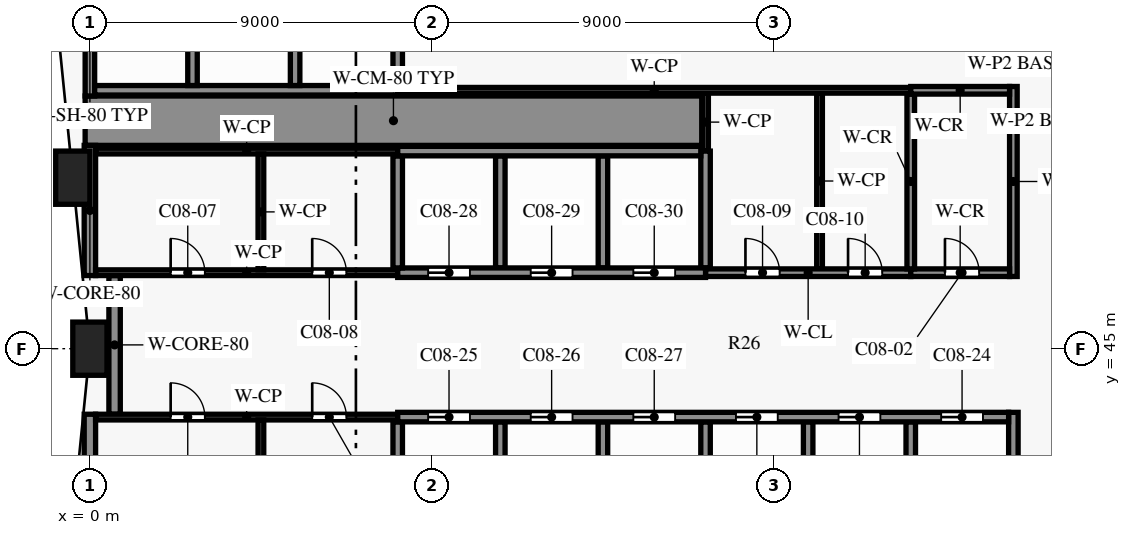
"""IFC4 building model, lengths in metres.
Left out: names, types, materials, properties, quantities, classifications, styles, units other than length and angle.
Written with IfcOpenShell. Run it as: python <this file> out.ifc"""

import sys

from ifc_helpers import new_model, si_unit, direction, frame, frame_2d, origin, origin_2d, place, context, subcontext, project, spatial, rectangle, extrude, element, fill, save


model = new_model("IFC4")
c1 = context("Model", 3, precision=1e-05, world=origin(), true_north=direction((0.0, 1.0)))
c2 = subcontext(c1, "Body", "Model", "MODEL_VIEW")
j1 = project(units=[si_unit("LENGTHUNIT", "METRE"), si_unit("PLANEANGLEUNIT", "RADIAN")], contexts=[c1])
p1 = place(None, origin())
s1 = spatial("IfcSite", under=j1, at=p1, CompositionType="ELEMENT")
p2 = place(p1, origin())
s2 = spatial("IfcBuilding", under=s1, at=p2, CompositionType="ELEMENT")
p3 = place(p2, frame((0.0, 0.0, 44.7)))
s3 = spatial("IfcBuildingStorey", under=s2, at=p3, CompositionType="ELEMENT", Elevation=44.7)
for number, where, z_axis, x_axis in (
    (1, (-0.45, 49.5, 0.0), (0.0, 0.0, 1.0), (0.1, -0.995, 0.0)),
    (2, (0.0, 45.0, 0.0), (0.0, 0.0, 1.0), (0.0, -1.0, 0.0)),
):
    element("IfcColumn", number, at=place(p3, frame(where, z_axis=z_axis, x_axis=x_axis)), inside=s3, PredefinedType="COLUMN", context=c2, shape_type="SweptSolid", body=[
        extrude(rectangle(XDim=0.9, YDim=1.4, at=origin_2d()), origin(), (0.0, 0.0, 1.0), 3.6),
    ])
p4 = place(p3, frame((0.15, 43.2, 0.0), z_axis=(0.0, 0.0, 1.0), x_axis=(1.0, 0.0, 0.0)))
e3 = element("IfcWall", 3, at=p4, inside=s3, PredefinedType="PARTITIONING", context=c2, shape_type="SweptSolid", body=[
    extrude(rectangle(XDim=7.95, YDim=0.15, at=frame_2d((3.975, 0.0))), origin(), (0.0, 0.0, 1.0), 3.3),
])
p5 = place(p4, frame((1.975, 0.0, 0.0)))
e4 = element("IfcOpeningElement", 4, at=p5, cuts=e3, PredefinedType="OPENING", context=c2, shape_type="SweptSolid", body=[
    extrude(rectangle(XDim=0.9, YDim=2.1, at=frame_2d((0.45, 1.05))), frame((0.0, 0.085, 0.0), z_axis=(0.0, -1.0, 0.0), x_axis=(1.0, 0.0, 0.0)), (0.0, 0.0, 1.0), 0.17),
])
p6 = place(p4, frame((5.7, 0.0, 0.0)))
e5 = element("IfcOpeningElement", 5, at=p6, cuts=e3, PredefinedType="OPENING", context=c2, shape_type="SweptSolid", body=[
    extrude(rectangle(XDim=0.9, YDim=2.1, at=frame_2d((0.45, 1.05))), frame((0.0, 0.085, 0.0), z_axis=(0.0, -1.0, 0.0), x_axis=(1.0, 0.0, 0.0)), (0.0, 0.0, 1.0), 0.17),
])
p7 = place(p3, frame((8.1, 43.2, 0.0), z_axis=(0.0, 0.0, 1.0), x_axis=(1.0, 0.0, 0.0)))
e6 = element("IfcWall", 6, at=p7, inside=s3, PredefinedType="SHEAR", context=c2, shape_type="SweptSolid", body=[
    extrude(rectangle(XDim=16.075, YDim=0.25, at=frame_2d((8.038, 0.0))), origin(), (0.0, 0.0, 1.0), 3.3),
])
p8 = place(p7, frame((14.3, 0.0, 0.0)))
e7 = element("IfcOpeningElement", 7, at=p8, cuts=e6, PredefinedType="OPENING", context=c2, shape_type="SweptSolid", body=[
    extrude(rectangle(XDim=1.1, YDim=2.1, at=frame_2d((0.55, 1.05))), frame((0.0, 0.135, 0.0), z_axis=(0.0, -1.0, 0.0), x_axis=(1.0, 0.0, 0.0)), (0.0, 0.0, 1.0), 0.27),
])
p9 = place(p7, frame((0.8, 0.0, 0.0)))
e8 = element("IfcOpeningElement", 8, at=p9, cuts=e6, PredefinedType="OPENING", context=c2, shape_type="SweptSolid", body=[
    extrude(rectangle(XDim=1.1, YDim=2.1, at=frame_2d((0.55, 1.05))), frame((0.0, 0.135, 0.0), z_axis=(0.0, -1.0, 0.0), x_axis=(1.0, 0.0, 0.0)), (0.0, 0.0, 1.0), 0.27),
])
p10 = place(p7, frame((3.5, 0.0, 0.0)))
e9 = element("IfcOpeningElement", 9, at=p10, cuts=e6, PredefinedType="OPENING", context=c2, shape_type="SweptSolid", body=[
    extrude(rectangle(XDim=1.1, YDim=2.1, at=frame_2d((0.55, 1.05))), frame((0.0, 0.135, 0.0), z_axis=(0.0, -1.0, 0.0), x_axis=(1.0, 0.0, 0.0)), (0.0, 0.0, 1.0), 0.27),
])
p11 = place(p7, frame((6.2, 0.0, 0.0)))
e10 = element("IfcOpeningElement", 10, at=p11, cuts=e6, PredefinedType="OPENING", context=c2, shape_type="SweptSolid", body=[
    extrude(rectangle(XDim=1.1, YDim=2.1, at=frame_2d((0.55, 1.05))), frame((0.0, 0.135, 0.0), z_axis=(0.0, -1.0, 0.0), x_axis=(1.0, 0.0, 0.0)), (0.0, 0.0, 1.0), 0.27),
])
p12 = place(p7, frame((8.9, 0.0, 0.0)))
e11 = element("IfcOpeningElement", 11, at=p12, cuts=e6, PredefinedType="OPENING", context=c2, shape_type="SweptSolid", body=[
    extrude(rectangle(XDim=1.1, YDim=2.1, at=frame_2d((0.55, 1.05))), frame((0.0, 0.135, 0.0), z_axis=(0.0, -1.0, 0.0), x_axis=(1.0, 0.0, 0.0)), (0.0, 0.0, 1.0), 0.27),
])
p13 = place(p7, frame((11.6, 0.0, 0.0)))
e12 = element("IfcOpeningElement", 12, at=p13, cuts=e6, PredefinedType="OPENING", context=c2, shape_type="SweptSolid", body=[
    extrude(rectangle(XDim=1.1, YDim=2.1, at=frame_2d((0.55, 1.05))), frame((0.0, 0.135, 0.0), z_axis=(0.0, -1.0, 0.0), x_axis=(1.0, 0.0, 0.0)), (0.0, 0.0, 1.0), 0.27),
])
p14 = place(p3, frame((16.2, 47.0, 0.0), z_axis=(0.0, 0.0, 1.0), x_axis=(1.0, 0.0, 0.0)))
e13 = element("IfcWall", 13, at=p14, inside=s3, PredefinedType="PARTITIONING", context=c2, shape_type="SweptSolid", body=[
    extrude(rectangle(XDim=5.4, YDim=0.2, at=frame_2d((2.7, 0.0))), origin(), (0.0, 0.0, 1.0), 3.3),
])
p15 = place(p14, frame((1.05, 0.0, 0.0)))
e14 = element("IfcOpeningElement", 14, at=p15, cuts=e13, PredefinedType="OPENING", context=c2, shape_type="SweptSolid", body=[
    extrude(rectangle(XDim=0.9, YDim=2.1, at=frame_2d((0.45, 1.05))), frame((0.0, 0.11, 0.0), z_axis=(0.0, -1.0, 0.0), x_axis=(1.0, 0.0, 0.0)), (0.0, 0.0, 1.0), 0.22),
])
p16 = place(p14, frame((3.75, 0.0, 0.0)))
e15 = element("IfcOpeningElement", 15, at=p16, cuts=e13, PredefinedType="OPENING", context=c2, shape_type="SweptSolid", body=[
    extrude(rectangle(XDim=0.9, YDim=2.1, at=frame_2d((0.45, 1.05))), frame((0.0, 0.11, 0.0), z_axis=(0.0, -1.0, 0.0), x_axis=(1.0, 0.0, 0.0)), (0.0, 0.0, 1.0), 0.22),
])
p17 = place(p3, frame((0.15, 47.0, 0.0), z_axis=(0.0, 0.0, 1.0), x_axis=(1.0, 0.0, 0.0)))
e16 = element("IfcWall", 16, at=p17, inside=s3, PredefinedType="PARTITIONING", context=c2, shape_type="SweptSolid", body=[
    extrude(rectangle(XDim=7.95, YDim=0.15, at=frame_2d((3.975, 0.0))), origin(), (0.0, 0.0, 1.0), 3.3),
])
p18 = place(p17, frame((1.975, 0.0, 0.0)))
e17 = element("IfcOpeningElement", 17, at=p18, cuts=e16, PredefinedType="OPENING", context=c2, shape_type="SweptSolid", body=[
    extrude(rectangle(XDim=0.9, YDim=2.1, at=frame_2d((0.45, 1.05))), frame((0.0, 0.085, 0.0), z_axis=(0.0, -1.0, 0.0), x_axis=(1.0, 0.0, 0.0)), (0.0, 0.0, 1.0), 0.17),
])
p19 = place(p17, frame((5.7, 0.0, 0.0)))
e18 = element("IfcOpeningElement", 18, at=p19, cuts=e16, PredefinedType="OPENING", context=c2, shape_type="SweptSolid", body=[
    extrude(rectangle(XDim=0.9, YDim=2.1, at=frame_2d((0.45, 1.05))), frame((0.0, 0.085, 0.0), z_axis=(0.0, -1.0, 0.0), x_axis=(1.0, 0.0, 0.0)), (0.0, 0.0, 1.0), 0.17),
])
p20 = place(p3, frame((21.6, 47.0, 0.0), z_axis=(0.0, 0.0, 1.0), x_axis=(1.0, 0.0, 0.0)))
e19 = element("IfcWall", 19, at=p20, inside=s3, PredefinedType="PARTITIONING", context=c2, shape_type="SweptSolid", body=[
    extrude(rectangle(XDim=2.6, YDim=0.2, at=frame_2d((1.3, 0.0))), origin(), (0.0, 0.0, 1.0), 3.3),
])
p21 = place(p20, frame((0.9, 0.0, 0.0)))
e20 = element("IfcOpeningElement", 20, at=p21, cuts=e19, PredefinedType="OPENING", context=c2, shape_type="SweptSolid", body=[
    extrude(rectangle(XDim=0.9, YDim=2.1, at=frame_2d((0.45, 1.05))), frame((0.0, 0.11, 0.0), z_axis=(0.0, -1.0, 0.0), x_axis=(1.0, 0.0, 0.0)), (0.0, 0.0, 1.0), 0.22),
])
p22 = place(p3, frame((8.1, 47.0, 0.0), z_axis=(0.0, 0.0, 1.0), x_axis=(1.0, 0.0, 0.0)))
e21 = element("IfcWall", 21, at=p22, inside=s3, PredefinedType="SHEAR", context=c2, shape_type="SweptSolid", body=[
    extrude(rectangle(XDim=8.1, YDim=0.25, at=frame_2d((4.05, 0.0))), origin(), (0.0, 0.0, 1.0), 3.3),
])
p23 = place(p22, frame((0.8, 0.0, 0.0)))
e22 = element("IfcOpeningElement", 22, at=p23, cuts=e21, PredefinedType="OPENING", context=c2, shape_type="SweptSolid", body=[
    extrude(rectangle(XDim=1.1, YDim=2.1, at=frame_2d((0.55, 1.05))), frame((0.0, 0.135, 0.0), z_axis=(0.0, -1.0, 0.0), x_axis=(1.0, 0.0, 0.0)), (0.0, 0.0, 1.0), 0.27),
])
p24 = place(p22, frame((3.5, 0.0, 0.0)))
e23 = element("IfcOpeningElement", 23, at=p24, cuts=e21, PredefinedType="OPENING", context=c2, shape_type="SweptSolid", body=[
    extrude(rectangle(XDim=1.1, YDim=2.1, at=frame_2d((0.55, 1.05))), frame((0.0, 0.135, 0.0), z_axis=(0.0, -1.0, 0.0), x_axis=(1.0, 0.0, 0.0)), (0.0, 0.0, 1.0), 0.27),
])
p25 = place(p22, frame((6.2, 0.0, 0.0)))
e24 = element("IfcOpeningElement", 24, at=p25, cuts=e21, PredefinedType="OPENING", context=c2, shape_type="SweptSolid", body=[
    extrude(rectangle(XDim=1.1, YDim=2.1, at=frame_2d((0.55, 1.05))), frame((0.0, 0.135, 0.0), z_axis=(0.0, -1.0, 0.0), x_axis=(1.0, 0.0, 0.0)), (0.0, 0.0, 1.0), 0.27),
])
p26 = place(p3, frame((0.15, 50.2, 0.0), z_axis=(0.0, 0.0, 1.0), x_axis=(1.0, 0.0, 0.0)))
e25 = element("IfcWall", 25, at=p26, inside=s3, PredefinedType="PARTITIONING", context=c2, shape_type="SweptSolid", body=[
    extrude(rectangle(XDim=7.95, YDim=0.15, at=frame_2d((3.975, 0.0))), origin(), (0.0, 0.0, 1.0), 3.3),
])
p27 = place(p3, frame((8.1, 50.2, 0.0), z_axis=(0.0, 0.0, 1.0), x_axis=(1.0, 0.0, 0.0)))
e26 = element("IfcWall", 26, at=p27, inside=s3, PredefinedType="SHEAR", context=c2, shape_type="SweptSolid", body=[
    extrude(rectangle(XDim=7.975, YDim=0.25, at=frame_2d((3.987, 0.0))), origin(), (0.0, 0.0, 1.0), 3.3),
])
p28 = place(p3, frame((-0.125, 51.0, 0.0), z_axis=(0.0, 0.0, 1.0), x_axis=(1.0, 0.0, 0.0)))
e27 = element("IfcWall", 27, at=p28, inside=s3, PredefinedType="SHEAR", context=c2, shape_type="SweptSolid", body=[
    extrude(rectangle(XDim=16.225, YDim=1.3, at=frame_2d((8.113, 0.0))), origin(), (0.0, 0.0, 1.0), 3.3),
])
p29 = place(p3, frame((8.1, 51.8, 0.0), z_axis=(0.0, 0.0, 1.0), x_axis=(1.0, 0.0, 0.0)))
e28 = element("IfcWall", 28, at=p29, inside=s3, PredefinedType="PARTITIONING", context=c2, shape_type="SweptSolid", body=[
    extrude(rectangle(XDim=13.5, YDim=0.15, at=frame_2d((6.75, 0.0))), origin(), (0.0, 0.0, 1.0), 3.3),
])
p30 = place(p3, frame((21.6, 51.8, 0.0), z_axis=(0.0, 0.0, 1.0), x_axis=(1.0, 0.0, 0.0)))
e29 = element("IfcWall", 29, at=p30, inside=s3, PredefinedType="PARTITIONING", context=c2, shape_type="SweptSolid", body=[
    extrude(rectangle(XDim=2.6, YDim=0.2, at=frame_2d((1.3, 0.0))), origin(), (0.0, 0.0, 1.0), 3.3),
])
p31 = place(p3, frame((0.125, 51.8, 0.0), z_axis=(0.0, 0.0, 1.0), x_axis=(1.0, 0.0, 0.0)))
e30 = element("IfcWall", 30, at=p31, inside=s3, PredefinedType="SHEAR", context=c2, shape_type="SweptSolid", body=[
    extrude(rectangle(XDim=7.975, YDim=0.25, at=frame_2d((3.988, 0.0))), origin(), (0.0, 0.0, 1.0), 3.3),
])
p32 = place(p3, frame((0.0, 35.925, 0.0), z_axis=(0.0, 0.0, 1.0), x_axis=(0.0, 1.0, 0.0)))
e31 = element("IfcWall", 31, at=p32, inside=s3, PredefinedType="SHEAR", context=c2, shape_type="SweptSolid", body=[
    extrude(rectangle(XDim=7.35, YDim=0.3, at=frame_2d((3.675, 0.0))), origin(), (0.0, 0.0, 1.0), 3.3),
])
p33 = place(p3, frame((0.0, 46.925, 0.0), z_axis=(0.0, 0.0, 1.0), x_axis=(0.0, 1.0, 0.0)))
e32 = element("IfcWall", 32, at=p33, inside=s3, PredefinedType="SHEAR", context=c2, shape_type="SweptSolid", body=[
    extrude(rectangle(XDim=3.425, YDim=0.3, at=frame_2d((1.712, 0.0))), origin(), (0.0, 0.0, 1.0), 3.3),
])
p34 = place(p3, frame((0.0, 51.65, 0.0), z_axis=(0.0, 0.0, 1.0), x_axis=(0.0, 1.0, 0.0)))
e33 = element("IfcWall", 33, at=p34, inside=s3, PredefinedType="SHEAR", context=c2, shape_type="SweptSolid", body=[
    extrude(rectangle(XDim=3.35, YDim=0.25, at=frame_2d((1.675, 0.0))), origin(), (0.0, 0.0, 1.0), 3.3),
])
p35 = place(p3, frame((0.65, 43.275, 0.0), z_axis=(0.0, 0.0, 1.0), x_axis=(0.0, 1.0, 0.0)))
e34 = element("IfcWall", 34, at=p35, inside=s3, PredefinedType="SHEAR", context=c2, shape_type="SweptSolid", body=[
    extrude(rectangle(XDim=3.65, YDim=0.3, at=frame_2d((1.825, 0.0))), origin(), (0.0, 0.0, 1.0), 3.3),
])
p36 = place(p3, frame((2.7, 51.925, 0.0), z_axis=(0.0, 0.0, 1.0), x_axis=(0.0, 1.0, 0.0)))
e35 = element("IfcWall", 35, at=p36, inside=s3, PredefinedType="SHEAR", context=c2, shape_type="SweptSolid", body=[
    extrude(rectangle(XDim=2.95, YDim=0.25, at=frame_2d((1.475, 0.0))), origin(), (0.0, 0.0, 1.0), 3.3),
])
for number, where, z_axis, x_axis in (
    (36, (4.5, 40.075, 0.0), (0.0, 0.0, 1.0), (0.0, 1.0, 0.0)),
    (37, (4.5, 47.075, 0.0), (0.0, 0.0, 1.0), (0.0, 1.0, 0.0)),
):
    element("IfcWall", number, at=place(p3, frame(where, z_axis=z_axis, x_axis=x_axis)), inside=s3, PredefinedType="PARTITIONING", context=c2, shape_type="SweptSolid", body=[
        extrude(rectangle(XDim=3.05, YDim=0.15, at=frame_2d((1.525, 0.0))), origin(), (0.0, 0.0, 1.0), 3.3),
    ])
for number, where, z_axis, x_axis in (
    (38, (5.4, 51.925, 0.0), (0.0, 0.0, 1.0), (0.0, 1.0, 0.0)),
    (39, (8.1, 40.125, 0.0), (0.0, 0.0, 1.0), (0.0, 1.0, 0.0)),
    (40, (8.1, 47.125, 0.0), (0.0, 0.0, 1.0), (0.0, 1.0, 0.0)),
    (41, (8.1, 51.925, 0.0), (0.0, 0.0, 1.0), (0.0, 1.0, 0.0)),
    (42, (10.8, 40.125, 0.0), (0.0, 0.0, 1.0), (0.0, 1.0, 0.0)),
    (43, (10.8, 47.125, 0.0), (0.0, 0.0, 1.0), (0.0, 1.0, 0.0)),
    (44, (13.5, 40.125, 0.0), (0.0, 0.0, 1.0), (0.0, 1.0, 0.0)),
    (45, (13.5, 47.125, 0.0), (0.0, 0.0, 1.0), (0.0, 1.0, 0.0)),
):
    element("IfcWall", number, at=place(p3, frame(where, z_axis=z_axis, x_axis=x_axis)), inside=s3, PredefinedType="SHEAR", context=c2, shape_type="SweptSolid", body=[
        extrude(rectangle(XDim=2.95, YDim=0.25, at=frame_2d((1.475, 0.0))), origin(), (0.0, 0.0, 1.0), 3.3),
    ])
p37 = place(p3, frame((16.2, 50.2, 0.0), z_axis=(0.0, 0.0, 1.0), x_axis=(0.0, 1.0, 0.0)))
e46 = element("IfcWall", 46, at=p37, inside=s3, PredefinedType="PARTITIONING", context=c2, shape_type="SweptSolid", body=[
    extrude(rectangle(XDim=1.525, YDim=0.15, at=frame_2d((0.763, 0.0))), origin(), (0.0, 0.0, 1.0), 3.3),
])
p38 = place(p3, frame((16.2, 40.125, 0.0), z_axis=(0.0, 0.0, 1.0), x_axis=(0.0, 1.0, 0.0)))
e47 = element("IfcWall", 47, at=p38, inside=s3, PredefinedType="SHEAR", context=c2, shape_type="SweptSolid", body=[
    extrude(rectangle(XDim=2.95, YDim=0.25, at=frame_2d((1.475, 0.0))), origin(), (0.0, 0.0, 1.0), 3.3),
])
p39 = place(p3, frame((16.2, 47.125, 0.0), z_axis=(0.0, 0.0, 1.0), x_axis=(0.0, 1.0, 0.0)))
e48 = element("IfcWall", 48, at=p39, inside=s3, PredefinedType="SHEAR", context=c2, shape_type="SweptSolid", body=[
    extrude(rectangle(XDim=3.075, YDim=0.25, at=frame_2d((1.538, 0.0))), origin(), (0.0, 0.0, 1.0), 3.3),
])
p40 = place(p3, frame((18.9, 40.125, 0.0), z_axis=(0.0, 0.0, 1.0), x_axis=(0.0, 1.0, 0.0)))
e49 = element("IfcWall", 49, at=p40, inside=s3, PredefinedType="SHEAR", context=c2, shape_type="SweptSolid", body=[
    extrude(rectangle(XDim=2.95, YDim=0.25, at=frame_2d((1.475, 0.0))), origin(), (0.0, 0.0, 1.0), 3.3),
])
p41 = place(p3, frame((19.2, 47.1, 0.0), z_axis=(0.0, 0.0, 1.0), x_axis=(0.0, 1.0, 0.0)))
e50 = element("IfcWall", 50, at=p41, inside=s3, PredefinedType="PARTITIONING", context=c2, shape_type="SweptSolid", body=[
    extrude(rectangle(XDim=4.625, YDim=0.15, at=frame_2d((2.312, 0.0))), origin(), (0.0, 0.0, 1.0), 3.3),
])
p42 = place(p3, frame((21.6, 47.1, 0.0), z_axis=(0.0, 0.0, 1.0), x_axis=(0.0, 1.0, 0.0)))
e51 = element("IfcWall", 51, at=p42, inside=s3, PredefinedType="PARTITIONING", context=c2, shape_type="SweptSolid", body=[
    extrude(rectangle(XDim=4.6, YDim=0.2, at=frame_2d((2.3, 0.0))), origin(), (0.0, 0.0, 1.0), 3.3),
])
p43 = place(p3, frame((21.6, 40.125, 0.0), z_axis=(0.0, 0.0, 1.0), x_axis=(0.0, 1.0, 0.0)))
e52 = element("IfcWall", 52, at=p43, inside=s3, PredefinedType="SHEAR", context=c2, shape_type="SweptSolid", body=[
    extrude(rectangle(XDim=2.95, YDim=0.25, at=frame_2d((1.475, 0.0))), origin(), (0.0, 0.0, 1.0), 3.3),
])
p44 = place(p3, frame((24.3, 46.9, 0.0), z_axis=(0.0, 0.0, 1.0), x_axis=(0.0, 1.0, 0.0)))
e53 = element("IfcWall", 53, at=p44, inside=s3, PredefinedType="SHEAR", context=c2, shape_type="SweptSolid", body=[
    extrude(rectangle(XDim=5.0, YDim=0.2, at=frame_2d((2.5, 0.0))), origin(), (0.0, 0.0, 1.0), 3.3),
])
p45 = place(p3, frame((24.3, 40.0, 0.0), z_axis=(0.0, 0.0, 1.0), x_axis=(0.0, 1.0, 0.0)))
e54 = element("IfcWall", 54, at=p45, inside=s3, PredefinedType="SHEAR", context=c2, shape_type="SweptSolid", body=[
    extrude(rectangle(XDim=3.325, YDim=0.25, at=frame_2d((1.663, 0.0))), origin(), (0.0, 0.0, 1.0), 3.3),
])
p46 = place(p21, origin())
e55 = element("IfcDoor", 55, at=p46, inside=s3, OperationType="SINGLE_SWING_LEFT", PredefinedType="DOOR", context=c2, shape_type="SweptSolid", body=[
    extrude(rectangle(XDim=0.9, YDim=2.1, at=frame_2d((0.45, 1.05))), frame((0.0, 0.025, 0.0), z_axis=(0.0, -1.0, 0.0), x_axis=(1.0, 0.0, 0.0)), (0.0, 0.0, 1.0), 0.05),
])
fill(e20, e55)
p47 = place(p18, origin())
e56 = element("IfcDoor", 56, at=p47, inside=s3, OperationType="SINGLE_SWING_RIGHT", PredefinedType="DOOR", context=c2, shape_type="SweptSolid", body=[
    extrude(rectangle(XDim=0.9, YDim=2.1, at=frame_2d((0.45, 1.05))), frame((0.0, 0.025, 0.0), z_axis=(0.0, -1.0, 0.0), x_axis=(1.0, 0.0, 0.0)), (0.0, 0.0, 1.0), 0.05),
])
fill(e17, e56)
p48 = place(p19, origin())
e57 = element("IfcDoor", 57, at=p48, inside=s3, OperationType="SINGLE_SWING_LEFT", PredefinedType="DOOR", context=c2, shape_type="SweptSolid", body=[
    extrude(rectangle(XDim=0.9, YDim=2.1, at=frame_2d((0.45, 1.05))), frame((0.0, 0.025, 0.0), z_axis=(0.0, -1.0, 0.0), x_axis=(1.0, 0.0, 0.0)), (0.0, 0.0, 1.0), 0.05),
])
fill(e18, e57)
p49 = place(p15, origin())
e58 = element("IfcDoor", 58, at=p49, inside=s3, OperationType="SINGLE_SWING_LEFT", PredefinedType="DOOR", context=c2, shape_type="SweptSolid", body=[
    extrude(rectangle(XDim=0.9, YDim=2.1, at=frame_2d((0.45, 1.05))), frame((0.0, 0.025, 0.0), z_axis=(0.0, -1.0, 0.0), x_axis=(1.0, 0.0, 0.0)), (0.0, 0.0, 1.0), 0.05),
])
fill(e14, e58)
p50 = place(p16, origin())
e59 = element("IfcDoor", 59, at=p50, inside=s3, OperationType="SINGLE_SWING_RIGHT", PredefinedType="DOOR", context=c2, shape_type="SweptSolid", body=[
    extrude(rectangle(XDim=0.9, YDim=2.1, at=frame_2d((0.45, 1.05))), frame((0.0, 0.025, 0.0), z_axis=(0.0, -1.0, 0.0), x_axis=(1.0, 0.0, 0.0)), (0.0, 0.0, 1.0), 0.05),
])
fill(e15, e59)
p51 = place(p5, origin())
e60 = element("IfcDoor", 60, at=p51, inside=s3, OperationType="SINGLE_SWING_LEFT", PredefinedType="DOOR", context=c2, shape_type="SweptSolid", body=[
    extrude(rectangle(XDim=0.9, YDim=2.1, at=frame_2d((0.45, 1.05))), frame((0.0, 0.025, 0.0), z_axis=(0.0, -1.0, 0.0), x_axis=(1.0, 0.0, 0.0)), (0.0, 0.0, 1.0), 0.05),
])
fill(e4, e60)
p52 = place(p6, origin())
e61 = element("IfcDoor", 61, at=p52, inside=s3, OperationType="SINGLE_SWING_RIGHT", PredefinedType="DOOR", context=c2, shape_type="SweptSolid", body=[
    extrude(rectangle(XDim=0.9, YDim=2.1, at=frame_2d((0.45, 1.05))), frame((0.0, 0.025, 0.0), z_axis=(0.0, -1.0, 0.0), x_axis=(1.0, 0.0, 0.0)), (0.0, 0.0, 1.0), 0.05),
])
fill(e5, e61)
p53 = place(p8, origin())
e62 = element("IfcDoor", 62, at=p53, inside=s3, OperationType="DOUBLE_DOOR_SLIDING", PredefinedType="DOOR", context=c2, shape_type="SweptSolid", body=[
    extrude(rectangle(XDim=1.1, YDim=2.1, at=frame_2d((0.55, 1.05))), frame((0.0, 0.025, 0.0), z_axis=(0.0, -1.0, 0.0), x_axis=(1.0, 0.0, 0.0)), (0.0, 0.0, 1.0), 0.05),
])
fill(e7, e62)
p54 = place(p9, origin())
e63 = element("IfcDoor", 63, at=p54, inside=s3, OperationType="DOUBLE_DOOR_SLIDING", PredefinedType="DOOR", context=c2, shape_type="SweptSolid", body=[
    extrude(rectangle(XDim=1.1, YDim=2.1, at=frame_2d((0.55, 1.05))), frame((0.0, 0.025, 0.0), z_axis=(0.0, -1.0, 0.0), x_axis=(1.0, 0.0, 0.0)), (0.0, 0.0, 1.0), 0.05),
])
fill(e8, e63)
p55 = place(p10, origin())
e64 = element("IfcDoor", 64, at=p55, inside=s3, OperationType="DOUBLE_DOOR_SLIDING", PredefinedType="DOOR", context=c2, shape_type="SweptSolid", body=[
    extrude(rectangle(XDim=1.1, YDim=2.1, at=frame_2d((0.55, 1.05))), frame((0.0, 0.025, 0.0), z_axis=(0.0, -1.0, 0.0), x_axis=(1.0, 0.0, 0.0)), (0.0, 0.0, 1.0), 0.05),
])
fill(e9, e64)
p56 = place(p11, origin())
e65 = element("IfcDoor", 65, at=p56, inside=s3, OperationType="DOUBLE_DOOR_SLIDING", PredefinedType="DOOR", context=c2, shape_type="SweptSolid", body=[
    extrude(rectangle(XDim=1.1, YDim=2.1, at=frame_2d((0.55, 1.05))), frame((0.0, 0.025, 0.0), z_axis=(0.0, -1.0, 0.0), x_axis=(1.0, 0.0, 0.0)), (0.0, 0.0, 1.0), 0.05),
])
fill(e10, e65)
p57 = place(p23, origin())
e66 = element("IfcDoor", 66, at=p57, inside=s3, OperationType="DOUBLE_DOOR_SLIDING", PredefinedType="DOOR", context=c2, shape_type="SweptSolid", body=[
    extrude(rectangle(XDim=1.1, YDim=2.1, at=frame_2d((0.55, 1.05))), frame((0.0, 0.025, 0.0), z_axis=(0.0, -1.0, 0.0), x_axis=(1.0, 0.0, 0.0)), (0.0, 0.0, 1.0), 0.05),
])
fill(e22, e66)
p58 = place(p24, origin())
e67 = element("IfcDoor", 67, at=p58, inside=s3, OperationType="DOUBLE_DOOR_SLIDING", PredefinedType="DOOR", context=c2, shape_type="SweptSolid", body=[
    extrude(rectangle(XDim=1.1, YDim=2.1, at=frame_2d((0.55, 1.05))), frame((0.0, 0.025, 0.0), z_axis=(0.0, -1.0, 0.0), x_axis=(1.0, 0.0, 0.0)), (0.0, 0.0, 1.0), 0.05),
])
fill(e23, e67)
p59 = place(p25, origin())
e68 = element("IfcDoor", 68, at=p59, inside=s3, OperationType="DOUBLE_DOOR_SLIDING", PredefinedType="DOOR", context=c2, shape_type="SweptSolid", body=[
    extrude(rectangle(XDim=1.1, YDim=2.1, at=frame_2d((0.55, 1.05))), frame((0.0, 0.025, 0.0), z_axis=(0.0, -1.0, 0.0), x_axis=(1.0, 0.0, 0.0)), (0.0, 0.0, 1.0), 0.05),
])
fill(e24, e68)
p60 = place(p12, origin())
e69 = element("IfcDoor", 69, at=p60, inside=s3, OperationType="DOUBLE_DOOR_SLIDING", PredefinedType="DOOR", context=c2, shape_type="SweptSolid", body=[
    extrude(rectangle(XDim=1.1, YDim=2.1, at=frame_2d((0.55, 1.05))), frame((0.0, 0.025, 0.0), z_axis=(0.0, -1.0, 0.0), x_axis=(1.0, 0.0, 0.0)), (0.0, 0.0, 1.0), 0.05),
])
fill(e11, e69)
p61 = place(p13, origin())
e70 = element("IfcDoor", 70, at=p61, inside=s3, OperationType="DOUBLE_DOOR_SLIDING", PredefinedType="DOOR", context=c2, shape_type="SweptSolid", body=[
    extrude(rectangle(XDim=1.1, YDim=2.1, at=frame_2d((0.55, 1.05))), frame((0.0, 0.025, 0.0), z_axis=(0.0, -1.0, 0.0), x_axis=(1.0, 0.0, 0.0)), (0.0, 0.0, 1.0), 0.05),
])
fill(e12, e70)
save(model, sys.argv[1])
